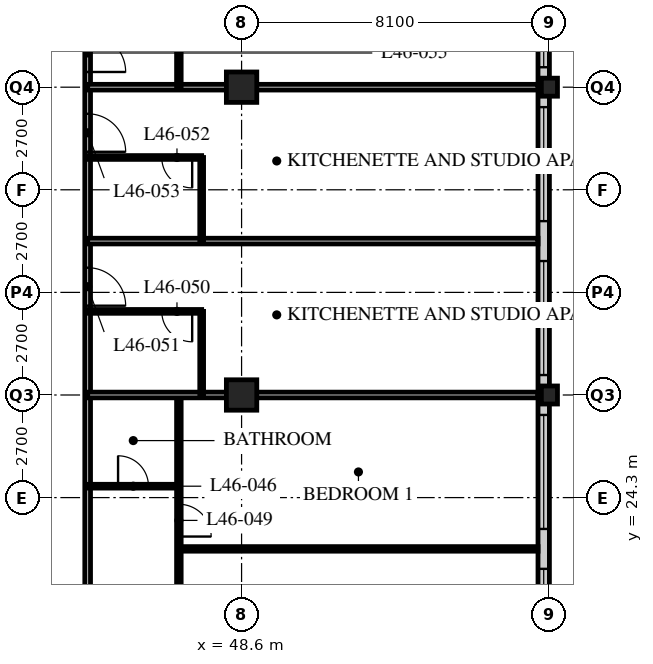
"""IFC4 building model, lengths in metres.
Left out: names, types, materials, properties, quantities, classifications, styles, units other than length and angle.
Written with IfcOpenShell. Run it as: python <this file> out.ifc"""

import sys

from ifc_helpers import new_model, si_unit, direction, frame, frame_2d, origin, origin_2d, place, context, subcontext, project, spatial, rectangle, hollow_rectangle, i_section, extrude, element, fill, save


model = new_model("IFC4")
c1 = context("Model", 3, precision=1e-05, world=origin(), true_north=direction((0.0, 1.0)))
c2 = subcontext(c1, "Body", "Model", "MODEL_VIEW")
j1 = project(units=[si_unit("LENGTHUNIT", "METRE"), si_unit("PLANEANGLEUNIT", "RADIAN")], contexts=[c1])
p1 = place(None, origin())
s1 = spatial("IfcSite", under=j1, at=p1, CompositionType="ELEMENT")
p2 = place(p1, origin())
s2 = spatial("IfcBuilding", under=s1, at=p2, CompositionType="ELEMENT")
p3 = place(p2, frame((0.0, 0.0, 181.2)))
s3 = spatial("IfcBuildingStorey", under=s2, at=p3, CompositionType="ELEMENT", Elevation=181.2)
for number, where, z_axis, x_axis in (
    (1, (48.6, 27.0, 0.0), (0.0, 0.0, 1.0), (1.0, 0.0, 0.0)),
    (2, (48.6, 35.1, 0.0), (0.0, 0.0, 1.0), (1.0, 0.0, 0.0)),
):
    element("IfcColumn", number, at=place(p3, frame(where, z_axis=z_axis, x_axis=x_axis)), inside=s3, PredefinedType="COLUMN", context=c2, shape_type="SweptSolid", body=[
        extrude(hollow_rectangle(XDim=0.8, YDim=0.8, WallThickness=0.08, at=origin_2d()), origin(), (0.0, 0.0, 1.0), 3.6),
    ])
for number, where, z_axis, x_axis in (
    (3, (56.7, 27.0, 0.0), (0.0, 0.0, 1.0), (1.0, 0.0, 0.0)),
    (4, (56.7, 35.1, 0.0), (0.0, 0.0, 1.0), (1.0, 0.0, 0.0)),
):
    element("IfcColumn", number, at=place(p3, frame(where, z_axis=z_axis, x_axis=x_axis)), inside=s3, PredefinedType="COLUMN", context=c2, shape_type="SweptSolid", body=[
        extrude(i_section(OverallWidth=0.424, OverallDepth=0.475, WebThickness=0.048, FlangeThickness=0.077, FilletRadius=0.015, at=origin_2d()), origin(), (0.0, 0.0, 1.0), 3.6),
    ])
p4 = place(p3, frame((56.55, 19.2, 0.0), z_axis=(0.0, 0.0, 1.0), x_axis=(0.0, 1.0, 0.0)))
e5 = element("IfcWall", 5, at=p4, inside=s3, PredefinedType="SOLIDWALL", context=c2, shape_type="SweptSolid", body=[
    extrude(rectangle(XDim=32.1, YDim=0.3, at=frame_2d((16.05, 0.0))), origin(), (0.0, 0.0, 1.0), 3.39),
])
p5 = place(p4, frame((0.225, 0.0, 0.6)))
e6 = element("IfcOpeningElement", 6, at=p5, cuts=e5, PredefinedType="OPENING", context=c2, shape_type="SweptSolid", body=[
    extrude(rectangle(XDim=3.0, YDim=2.4, at=frame_2d((1.5, 1.2))), frame((0.0, 0.16, 0.0), z_axis=(0.0, -1.0, 0.0), x_axis=(1.0, 0.0, 0.0)), (0.0, 0.0, 1.0), 0.32),
])
p6 = place(p4, frame((4.275, 0.0, 0.6)))
e7 = element("IfcOpeningElement", 7, at=p6, cuts=e5, PredefinedType="OPENING", context=c2, shape_type="SweptSolid", body=[
    extrude(rectangle(XDim=3.0, YDim=2.4, at=frame_2d((1.5, 1.2))), frame((0.0, 0.16, 0.0), z_axis=(0.0, -1.0, 0.0), x_axis=(1.0, 0.0, 0.0)), (0.0, 0.0, 1.0), 0.32),
])
p7 = place(p4, frame((8.325, 0.0, 0.6)))
e8 = element("IfcOpeningElement", 8, at=p7, cuts=e5, PredefinedType="OPENING", context=c2, shape_type="SweptSolid", body=[
    extrude(rectangle(XDim=3.0, YDim=2.4, at=frame_2d((1.5, 1.2))), frame((0.0, 0.16, 0.0), z_axis=(0.0, -1.0, 0.0), x_axis=(1.0, 0.0, 0.0)), (0.0, 0.0, 1.0), 0.32),
])
p8 = place(p4, frame((12.375, 0.0, 0.6)))
e9 = element("IfcOpeningElement", 9, at=p8, cuts=e5, PredefinedType="OPENING", context=c2, shape_type="SweptSolid", body=[
    extrude(rectangle(XDim=3.0, YDim=2.4, at=frame_2d((1.5, 1.2))), frame((0.0, 0.16, 0.0), z_axis=(0.0, -1.0, 0.0), x_axis=(1.0, 0.0, 0.0)), (0.0, 0.0, 1.0), 0.32),
])
p9 = place(p4, frame((16.425, 0.0, 0.6)))
e10 = element("IfcOpeningElement", 10, at=p9, cuts=e5, PredefinedType="OPENING", context=c2, shape_type="SweptSolid", body=[
    extrude(rectangle(XDim=3.0, YDim=2.4, at=frame_2d((1.5, 1.2))), frame((0.0, 0.16, 0.0), z_axis=(0.0, -1.0, 0.0), x_axis=(1.0, 0.0, 0.0)), (0.0, 0.0, 1.0), 0.32),
])
p10 = place(p4, frame((20.475, 0.0, 0.6)))
e11 = element("IfcOpeningElement", 11, at=p10, cuts=e5, PredefinedType="OPENING", context=c2, shape_type="SweptSolid", body=[
    extrude(rectangle(XDim=3.0, YDim=2.4, at=frame_2d((1.5, 1.2))), frame((0.0, 0.16, 0.0), z_axis=(0.0, -1.0, 0.0), x_axis=(1.0, 0.0, 0.0)), (0.0, 0.0, 1.0), 0.32),
])
p11 = place(p4, frame((24.525, 0.0, 0.6)))
e12 = element("IfcOpeningElement", 12, at=p11, cuts=e5, PredefinedType="OPENING", context=c2, shape_type="SweptSolid", body=[
    extrude(rectangle(XDim=3.0, YDim=2.4, at=frame_2d((1.5, 1.2))), frame((0.0, 0.16, 0.0), z_axis=(0.0, -1.0, 0.0), x_axis=(1.0, 0.0, 0.0)), (0.0, 0.0, 1.0), 0.32),
])
p12 = place(p4, frame((28.575, 0.0, 0.6)))
e13 = element("IfcOpeningElement", 13, at=p12, cuts=e5, PredefinedType="OPENING", context=c2, shape_type="SweptSolid", body=[
    extrude(rectangle(XDim=3.0, YDim=2.4, at=frame_2d((1.5, 1.2))), frame((0.0, 0.16, 0.0), z_axis=(0.0, -1.0, 0.0), x_axis=(1.0, 0.0, 0.0)), (0.0, 0.0, 1.0), 0.32),
])
p13 = place(p3, frame((44.55, 18.9, 0.0), z_axis=(0.0, 0.0, 1.0), x_axis=(0.0, 1.0, 0.0)))
e14 = element("IfcWall", 14, at=p13, inside=s3, PredefinedType="PARTITIONING", context=c2, shape_type="SweptSolid", body=[
    extrude(rectangle(XDim=28.35, YDim=0.15, at=frame_2d((14.175, 0.0))), origin(), (0.0, 0.0, 1.0), 3.39),
])
p14 = place(p13, frame((0.4, 0.0, 0.0)))
e15 = element("IfcOpeningElement", 15, at=p14, cuts=e14, PredefinedType="OPENING", context=c2, shape_type="SweptSolid", body=[
    extrude(rectangle(XDim=1.0, YDim=2.1, at=frame_2d((0.5, 1.05))), frame((0.0, 0.085, 0.0), z_axis=(0.0, -1.0, 0.0), x_axis=(1.0, 0.0, 0.0)), (0.0, 0.0, 1.0), 0.17),
])
p15 = place(p13, frame((10.45, 0.0, 0.0)))
e16 = element("IfcOpeningElement", 16, at=p15, cuts=e14, PredefinedType="OPENING", context=c2, shape_type="SweptSolid", body=[
    extrude(rectangle(XDim=1.0, YDim=2.1, at=frame_2d((0.5, 1.05))), frame((0.0, 0.085, 0.0), z_axis=(0.0, -1.0, 0.0), x_axis=(1.0, 0.0, 0.0)), (0.0, 0.0, 1.0), 0.17),
])
p16 = place(p13, frame((14.5, 0.0, 0.0)))
e17 = element("IfcOpeningElement", 17, at=p16, cuts=e14, PredefinedType="OPENING", context=c2, shape_type="SweptSolid", body=[
    extrude(rectangle(XDim=1.0, YDim=2.1, at=frame_2d((0.5, 1.05))), frame((0.0, 0.085, 0.0), z_axis=(0.0, -1.0, 0.0), x_axis=(1.0, 0.0, 0.0)), (0.0, 0.0, 1.0), 0.17),
])
p17 = place(p13, frame((16.6, 0.0, 0.0)))
e18 = element("IfcOpeningElement", 18, at=p17, cuts=e14, PredefinedType="OPENING", context=c2, shape_type="SweptSolid", body=[
    extrude(rectangle(XDim=1.0, YDim=2.1, at=frame_2d((0.5, 1.05))), frame((0.0, 0.085, 0.0), z_axis=(0.0, -1.0, 0.0), x_axis=(1.0, 0.0, 0.0)), (0.0, 0.0, 1.0), 0.17),
])
p18 = place(p13, frame((26.65, 0.0, 0.0)))
e19 = element("IfcOpeningElement", 19, at=p18, cuts=e14, PredefinedType="OPENING", context=c2, shape_type="SweptSolid", body=[
    extrude(rectangle(XDim=1.0, YDim=2.1, at=frame_2d((0.5, 1.05))), frame((0.0, 0.085, 0.0), z_axis=(0.0, -1.0, 0.0), x_axis=(1.0, 0.0, 0.0)), (0.0, 0.0, 1.0), 0.17),
])
p19 = place(p3, frame((46.95, 18.9, 0.0), z_axis=(0.0, 0.0, 1.0), x_axis=(0.0, 1.0, 0.0)))
e20 = element("IfcWall", 20, at=p19, inside=s3, PredefinedType="PARTITIONING", context=c2, shape_type="SweptSolid", body=[
    extrude(rectangle(XDim=8.1, YDim=0.12, at=frame_2d((4.05, 0.0))), origin(), (0.0, 0.0, 1.0), 3.39),
])
p20 = place(p19, frame((0.975, 0.0, 0.0)))
e21 = element("IfcOpeningElement", 21, at=p20, cuts=e20, PredefinedType="OPENING", context=c2, shape_type="SweptSolid", body=[
    extrude(rectangle(XDim=0.85, YDim=2.1, at=frame_2d((0.425, 1.05))), frame((0.0, 0.07, 0.0), z_axis=(0.0, -1.0, 0.0), x_axis=(1.0, 0.0, 0.0)), (0.0, 0.0, 1.0), 0.14),
])
p21 = place(p19, frame((4.375, 0.0, 0.0)))
e22 = element("IfcOpeningElement", 22, at=p21, cuts=e20, PredefinedType="OPENING", context=c2, shape_type="SweptSolid", body=[
    extrude(rectangle(XDim=0.85, YDim=2.1, at=frame_2d((0.425, 1.05))), frame((0.0, 0.07, 0.0), z_axis=(0.0, -1.0, 0.0), x_axis=(1.0, 0.0, 0.0)), (0.0, 0.0, 1.0), 0.14),
])
p22 = place(p3, frame((44.55, 24.6, 0.0), z_axis=(0.0, 0.0, 1.0), x_axis=(1.0, 0.0, 0.0)))
e23 = element("IfcWall", 23, at=p22, inside=s3, PredefinedType="PARTITIONING", context=c2, shape_type="SweptSolid", body=[
    extrude(rectangle(XDim=2.4, YDim=0.1, at=frame_2d((1.2, 0.0))), origin(), (0.0, 0.0, 1.0), 3.39),
])
p23 = place(p22, frame((0.8, 0.0, 0.0)))
e24 = element("IfcOpeningElement", 24, at=p23, cuts=e23, PredefinedType="OPENING", context=c2, shape_type="SweptSolid", body=[
    extrude(rectangle(XDim=0.8, YDim=2.1, at=frame_2d((0.4, 1.05))), frame((0.0, 0.06, 0.0), z_axis=(0.0, -1.0, 0.0), x_axis=(1.0, 0.0, 0.0)), (0.0, 0.0, 1.0), 0.12),
])
p24 = place(p3, frame((46.95, 22.95, 0.0), z_axis=(0.0, 0.0, 1.0), x_axis=(1.0, 0.0, 0.0)))
e25 = element("IfcWall", 25, at=p24, inside=s3, PredefinedType="PARTITIONING", context=c2, shape_type="SweptSolid", body=[
    extrude(rectangle(XDim=9.45, YDim=0.12, at=frame_2d((4.725, 0.0))), origin(), (0.0, 0.0, 1.0), 3.39),
])
p25 = place(p3, frame((44.55, 27.0, 0.0), z_axis=(0.0, 0.0, 1.0), x_axis=(1.0, 0.0, 0.0)))
e26 = element("IfcWall", 26, at=p25, inside=s3, PredefinedType="PARTITIONING", context=c2, shape_type="SweptSolid", body=[
    extrude(rectangle(XDim=11.85, YDim=0.15, at=frame_2d((5.925, 0.0))), origin(), (0.0, 0.0, 1.0), 2.778),
])
p26 = place(p3, frame((47.55, 27.0, 0.0), z_axis=(0.0, 0.0, 1.0), x_axis=(0.0, 1.0, 0.0)))
e27 = element("IfcWall", 27, at=p26, inside=s3, PredefinedType="PARTITIONING", context=c2, shape_type="SweptSolid", body=[
    extrude(rectangle(XDim=2.2, YDim=0.1, at=frame_2d((1.1, 0.0))), origin(), (0.0, 0.0, 1.0), 3.39),
])
p27 = place(p3, frame((44.55, 29.2, 0.0), z_axis=(0.0, 0.0, 1.0), x_axis=(1.0, 0.0, 0.0)))
e28 = element("IfcWall", 28, at=p27, inside=s3, PredefinedType="PARTITIONING", context=c2, shape_type="SweptSolid", body=[
    extrude(rectangle(XDim=3.0, YDim=0.1, at=frame_2d((1.5, 0.0))), origin(), (0.0, 0.0, 1.0), 3.39),
])
p28 = place(p27, frame((1.95, 0.0, 0.0)))
e29 = element("IfcOpeningElement", 29, at=p28, cuts=e28, PredefinedType="OPENING", context=c2, shape_type="SweptSolid", body=[
    extrude(rectangle(XDim=0.8, YDim=2.1, at=frame_2d((0.4, 1.05))), frame((0.0, 0.06, 0.0), z_axis=(0.0, -1.0, 0.0), x_axis=(1.0, 0.0, 0.0)), (0.0, 0.0, 1.0), 0.12),
])
p29 = place(p3, frame((44.55, 31.05, 0.0), z_axis=(0.0, 0.0, 1.0), x_axis=(1.0, 0.0, 0.0)))
e30 = element("IfcWall", 30, at=p29, inside=s3, PredefinedType="PARTITIONING", context=c2, shape_type="SweptSolid", body=[
    extrude(rectangle(XDim=11.85, YDim=0.15, at=frame_2d((5.925, 0.0))), origin(), (0.0, 0.0, 1.0), 3.39),
])
p30 = place(p3, frame((47.55, 31.05, 0.0), z_axis=(0.0, 0.0, 1.0), x_axis=(0.0, 1.0, 0.0)))
e31 = element("IfcWall", 31, at=p30, inside=s3, PredefinedType="PARTITIONING", context=c2, shape_type="SweptSolid", body=[
    extrude(rectangle(XDim=2.2, YDim=0.1, at=frame_2d((1.1, 0.0))), origin(), (0.0, 0.0, 1.0), 3.39),
])
p31 = place(p3, frame((44.55, 33.25, 0.0), z_axis=(0.0, 0.0, 1.0), x_axis=(1.0, 0.0, 0.0)))
e32 = element("IfcWall", 32, at=p31, inside=s3, PredefinedType="PARTITIONING", context=c2, shape_type="SweptSolid", body=[
    extrude(rectangle(XDim=3.0, YDim=0.1, at=frame_2d((1.5, 0.0))), origin(), (0.0, 0.0, 1.0), 3.39),
])
p32 = place(p31, frame((1.95, 0.0, 0.0)))
e33 = element("IfcOpeningElement", 33, at=p32, cuts=e32, PredefinedType="OPENING", context=c2, shape_type="SweptSolid", body=[
    extrude(rectangle(XDim=0.8, YDim=2.1, at=frame_2d((0.4, 1.05))), frame((0.0, 0.06, 0.0), z_axis=(0.0, -1.0, 0.0), x_axis=(1.0, 0.0, 0.0)), (0.0, 0.0, 1.0), 0.12),
])
p33 = place(p3, frame((44.55, 35.1, 0.0), z_axis=(0.0, 0.0, 1.0), x_axis=(1.0, 0.0, 0.0)))
e34 = element("IfcWall", 34, at=p33, inside=s3, PredefinedType="PARTITIONING", context=c2, shape_type="SweptSolid", body=[
    extrude(rectangle(XDim=11.85, YDim=0.15, at=frame_2d((5.925, 0.0))), origin(), (0.0, 0.0, 1.0), 2.778),
])
p34 = place(p3, frame((46.95, 35.1, 0.0), z_axis=(0.0, 0.0, 1.0), x_axis=(0.0, 1.0, 0.0)))
e35 = element("IfcWall", 35, at=p34, inside=s3, PredefinedType="PARTITIONING", context=c2, shape_type="SweptSolid", body=[
    extrude(rectangle(XDim=8.1, YDim=0.12, at=frame_2d((4.05, 0.0))), origin(), (0.0, 0.0, 1.0), 3.39),
])
p35 = place(p34, frame((0.975, 0.0, 0.0)))
e36 = element("IfcOpeningElement", 36, at=p35, cuts=e35, PredefinedType="OPENING", context=c2, shape_type="SweptSolid", body=[
    extrude(rectangle(XDim=0.85, YDim=2.1, at=frame_2d((0.425, 1.05))), frame((0.0, 0.07, 0.0), z_axis=(0.0, -1.0, 0.0), x_axis=(1.0, 0.0, 0.0)), (0.0, 0.0, 1.0), 0.14),
])
p36 = place(p34, frame((4.375, 0.0, 0.0)))
e37 = element("IfcOpeningElement", 37, at=p36, cuts=e35, PredefinedType="OPENING", context=c2, shape_type="SweptSolid", body=[
    extrude(rectangle(XDim=0.85, YDim=2.1, at=frame_2d((0.425, 1.05))), frame((0.0, 0.07, 0.0), z_axis=(0.0, -1.0, 0.0), x_axis=(1.0, 0.0, 0.0)), (0.0, 0.0, 1.0), 0.14),
])
p37 = place(p5, origin())
e38 = element("IfcWindow", 38, at=p37, inside=s3, PartitioningType="SINGLE_PANEL", PredefinedType="WINDOW", context=c2, shape_type="SweptSolid", body=[
    extrude(rectangle(XDim=3.0, YDim=2.4, at=frame_2d((1.5, 1.2))), frame((0.0, 0.03, 0.0), z_axis=(0.0, -1.0, 0.0), x_axis=(1.0, 0.0, 0.0)), (0.0, 0.0, 1.0), 0.06),
])
fill(e6, e38)
p38 = place(p6, origin())
e39 = element("IfcWindow", 39, at=p38, inside=s3, PartitioningType="SINGLE_PANEL", PredefinedType="WINDOW", context=c2, shape_type="SweptSolid", body=[
    extrude(rectangle(XDim=3.0, YDim=2.4, at=frame_2d((1.5, 1.2))), frame((0.0, 0.03, 0.0), z_axis=(0.0, -1.0, 0.0), x_axis=(1.0, 0.0, 0.0)), (0.0, 0.0, 1.0), 0.06),
])
fill(e7, e39)
p39 = place(p7, origin())
e40 = element("IfcWindow", 40, at=p39, inside=s3, PartitioningType="SINGLE_PANEL", PredefinedType="WINDOW", context=c2, shape_type="SweptSolid", body=[
    extrude(rectangle(XDim=3.0, YDim=2.4, at=frame_2d((1.5, 1.2))), frame((0.0, 0.03, 0.0), z_axis=(0.0, -1.0, 0.0), x_axis=(1.0, 0.0, 0.0)), (0.0, 0.0, 1.0), 0.06),
])
fill(e8, e40)
p40 = place(p8, origin())
e41 = element("IfcWindow", 41, at=p40, inside=s3, PartitioningType="SINGLE_PANEL", PredefinedType="WINDOW", context=c2, shape_type="SweptSolid", body=[
    extrude(rectangle(XDim=3.0, YDim=2.4, at=frame_2d((1.5, 1.2))), frame((0.0, 0.03, 0.0), z_axis=(0.0, -1.0, 0.0), x_axis=(1.0, 0.0, 0.0)), (0.0, 0.0, 1.0), 0.06),
])
fill(e9, e41)
p41 = place(p9, origin())
e42 = element("IfcWindow", 42, at=p41, inside=s3, PartitioningType="SINGLE_PANEL", PredefinedType="WINDOW", context=c2, shape_type="SweptSolid", body=[
    extrude(rectangle(XDim=3.0, YDim=2.4, at=frame_2d((1.5, 1.2))), frame((0.0, 0.03, 0.0), z_axis=(0.0, -1.0, 0.0), x_axis=(1.0, 0.0, 0.0)), (0.0, 0.0, 1.0), 0.06),
])
fill(e10, e42)
p42 = place(p23, origin())
e43 = element("IfcDoor", 43, at=p42, inside=s3, OperationType="SINGLE_SWING_LEFT", PredefinedType="DOOR", context=c2, shape_type="SweptSolid", body=[
    extrude(rectangle(XDim=0.8, YDim=2.1, at=frame_2d((0.4, 1.05))), frame((0.0, 0.025, 0.0), z_axis=(0.0, -1.0, 0.0), x_axis=(1.0, 0.0, 0.0)), (0.0, 0.0, 1.0), 0.05),
])
fill(e24, e43)
p43 = place(p21, origin())
e44 = element("IfcDoor", 44, at=p43, inside=s3, OperationType="SINGLE_SWING_RIGHT", PredefinedType="DOOR", context=c2, shape_type="SweptSolid", body=[
    extrude(rectangle(XDim=0.85, YDim=2.1, at=frame_2d((0.425, 1.05))), frame((0.0, 0.025, 0.0), z_axis=(0.0, -1.0, 0.0), x_axis=(1.0, 0.0, 0.0)), (0.0, 0.0, 1.0), 0.05),
])
fill(e22, e44)
p44 = place(p28, origin())
e45 = element("IfcDoor", 45, at=p44, inside=s3, OperationType="SINGLE_SWING_LEFT", PredefinedType="DOOR", context=c2, shape_type="SweptSolid", body=[
    extrude(rectangle(XDim=0.8, YDim=2.1, at=frame_2d((0.4, 1.05))), frame((0.0, 0.025, 0.0), z_axis=(0.0, -1.0, 0.0), x_axis=(1.0, 0.0, 0.0)), (0.0, 0.0, 1.0), 0.05),
])
fill(e29, e45)
p45 = place(p15, origin())
e46 = element("IfcDoor", 46, at=p45, inside=s3, OperationType="SINGLE_SWING_RIGHT", PredefinedType="DOOR", context=c2, shape_type="SweptSolid", body=[
    extrude(rectangle(XDim=1.0, YDim=2.1, at=frame_2d((0.5, 1.05))), frame((0.0, 0.025, 0.0), z_axis=(0.0, -1.0, 0.0), x_axis=(1.0, 0.0, 0.0)), (0.0, 0.0, 1.0), 0.05),
])
fill(e16, e46)
p46 = place(p32, origin())
e47 = element("IfcDoor", 47, at=p46, inside=s3, OperationType="SINGLE_SWING_LEFT", PredefinedType="DOOR", context=c2, shape_type="SweptSolid", body=[
    extrude(rectangle(XDim=0.8, YDim=2.1, at=frame_2d((0.4, 1.05))), frame((0.0, 0.025, 0.0), z_axis=(0.0, -1.0, 0.0), x_axis=(1.0, 0.0, 0.0)), (0.0, 0.0, 1.0), 0.05),
])
fill(e33, e47)
p47 = place(p16, origin())
e48 = element("IfcDoor", 48, at=p47, inside=s3, OperationType="SINGLE_SWING_RIGHT", PredefinedType="DOOR", context=c2, shape_type="SweptSolid", body=[
    extrude(rectangle(XDim=1.0, YDim=2.1, at=frame_2d((0.5, 1.05))), frame((0.0, 0.025, 0.0), z_axis=(0.0, -1.0, 0.0), x_axis=(1.0, 0.0, 0.0)), (0.0, 0.0, 1.0), 0.05),
])
fill(e17, e48)
p48 = place(p17, origin())
e49 = element("IfcDoor", 49, at=p48, inside=s3, OperationType="SINGLE_SWING_RIGHT", PredefinedType="DOOR", context=c2, shape_type="SweptSolid", body=[
    extrude(rectangle(XDim=1.0, YDim=2.1, at=frame_2d((0.5, 1.05))), frame((0.0, 0.025, 0.0), z_axis=(0.0, -1.0, 0.0), x_axis=(1.0, 0.0, 0.0)), (0.0, 0.0, 1.0), 0.05),
])
fill(e18, e49)
save(model, sys.argv[1])
